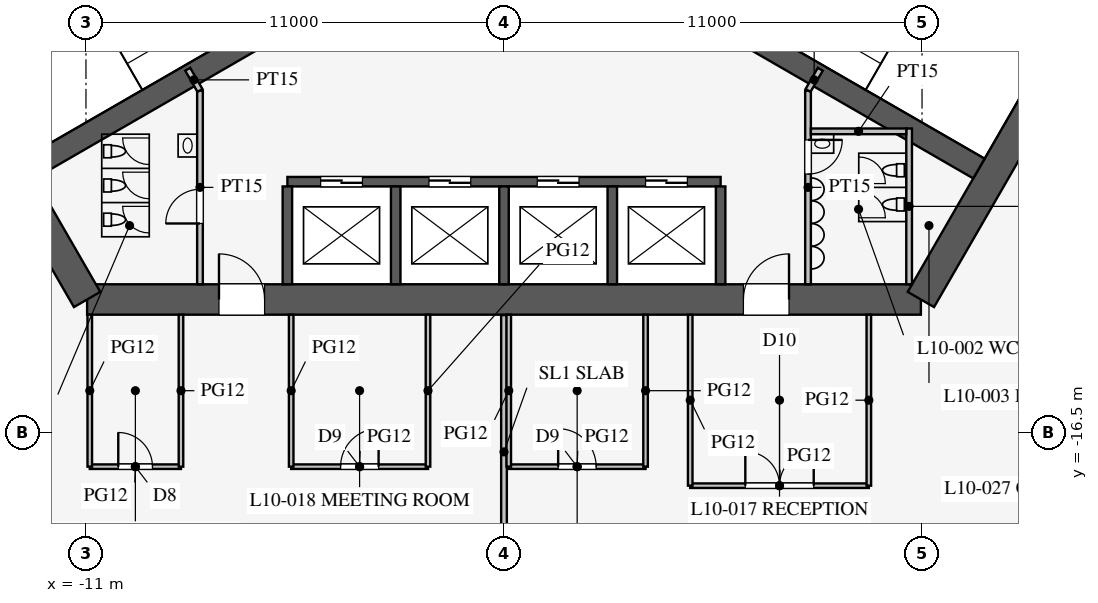
"""IFC4 building model, lengths in metres.
Left out: names, types, materials, properties, quantities, classifications, styles, units other than length and angle.
Written with IfcOpenShell. Run it as: python <this file> out.ifc"""

import sys

from ifc_helpers import new_model, si_unit, direction, frame, frame_2d, origin, place, context, subcontext, project, spatial, rectangle, extrude, element, fill, save


model = new_model("IFC4")
c1 = context("Model", 3, precision=1e-05, world=origin(), true_north=direction((0.0, 1.0)))
c2 = subcontext(c1, "Body", "Model", "MODEL_VIEW")
j1 = project(units=[si_unit("LENGTHUNIT", "METRE"), si_unit("PLANEANGLEUNIT", "RADIAN")], contexts=[c1])
p1 = place(None, origin())
s1 = spatial("IfcSite", under=j1, at=p1, CompositionType="ELEMENT")
p2 = place(p1, origin())
s2 = spatial("IfcBuilding", under=s1, at=p2, CompositionType="ELEMENT")
p3 = place(p2, frame((0.0, 0.0, 45.9)))
s3 = spatial("IfcBuildingStorey", under=s2, at=p3, CompositionType="ELEMENT", Elevation=45.9)
p4 = place(p3, frame((-10.97, -13.0, 0.0), z_axis=(0.0, 0.0, 1.0), x_axis=(1.0, 0.0, 0.0)))
e1 = element("IfcWall", 1, at=p4, inside=s3, PredefinedType="SHEAR", context=c2, shape_type="SweptSolid", body=[
    extrude(rectangle(XDim=21.939, YDim=0.8, at=frame_2d((10.97, 0.0))), origin(), (0.0, 0.0, 1.0), 4.2),
])
p5 = place(p4, frame((17.27, 0.0, 0.0)))
e2 = element("IfcOpeningElement", 2, at=p5, cuts=e1, PredefinedType="OPENING", context=c2, shape_type="SweptSolid", body=[
    extrude(rectangle(XDim=1.2, YDim=2.1, at=frame_2d((0.6, 1.05))), frame((0.0, 0.41, 0.0), z_axis=(0.0, -1.0, 0.0), x_axis=(1.0, 0.0, 0.0)), (0.0, 0.0, 1.0), 0.82),
])
p6 = place(p4, frame((3.47, 0.0, 0.0)))
e3 = element("IfcOpeningElement", 3, at=p6, cuts=e1, PredefinedType="OPENING", context=c2, shape_type="SweptSolid", body=[
    extrude(rectangle(XDim=1.2, YDim=2.1, at=frame_2d((0.6, 1.05))), frame((0.0, 0.41, 0.0), z_axis=(0.0, -1.0, 0.0), x_axis=(1.0, 0.0, 0.0)), (0.0, 0.0, 1.0), 0.82),
])
for number, where, z_axis, x_axis in (
    (4, (10.97, -13.0, 0.0), (0.0, 0.0, 1.0), (0.5, 0.866, 0.0)),
    (5, (-16.743, -3.0, 0.0), (0.0, 0.0, 1.0), (0.5, -0.866, 0.0)),
):
    element("IfcWall", number, at=place(p3, frame(where, z_axis=z_axis, x_axis=x_axis)), inside=s3, PredefinedType="SHEAR", context=c2, shape_type="SweptSolid", body=[
        extrude(rectangle(XDim=11.547, YDim=0.8, at=frame_2d((5.773, 0.0))), origin(), (0.0, 0.0, 1.0), 4.2),
    ])
p7 = place(p3, frame((-5.7, -9.9, 0.0), z_axis=(0.0, 0.0, 1.0), x_axis=(1.0, 0.0, 0.0)))
e6 = element("IfcWall", 6, at=p7, inside=s3, PredefinedType="SHEAR", context=c2, shape_type="SweptSolid", body=[
    extrude(rectangle(XDim=11.4, YDim=0.25, at=frame_2d((5.7, 0.0))), origin(), (0.0, 0.0, 1.0), 4.2),
])
p8 = place(p7, frame((0.875, 0.0, 0.0)))
e7 = element("IfcOpeningElement", 7, at=p8, cuts=e6, PredefinedType="OPENING", context=c2, shape_type="SweptSolid", body=[
    extrude(rectangle(XDim=1.1, YDim=2.2, at=frame_2d((0.55, 1.1))), frame((0.0, 0.135, 0.0), z_axis=(0.0, -1.0, 0.0), x_axis=(1.0, 0.0, 0.0)), (0.0, 0.0, 1.0), 0.27),
])
p9 = place(p7, frame((3.725, 0.0, 0.0)))
e8 = element("IfcOpeningElement", 8, at=p9, cuts=e6, PredefinedType="OPENING", context=c2, shape_type="SweptSolid", body=[
    extrude(rectangle(XDim=1.1, YDim=2.2, at=frame_2d((0.55, 1.1))), frame((0.0, 0.135, 0.0), z_axis=(0.0, -1.0, 0.0), x_axis=(1.0, 0.0, 0.0)), (0.0, 0.0, 1.0), 0.27),
])
p10 = place(p7, frame((6.575, 0.0, 0.0)))
e9 = element("IfcOpeningElement", 9, at=p10, cuts=e6, PredefinedType="OPENING", context=c2, shape_type="SweptSolid", body=[
    extrude(rectangle(XDim=1.1, YDim=2.2, at=frame_2d((0.55, 1.1))), frame((0.0, 0.135, 0.0), z_axis=(0.0, -1.0, 0.0), x_axis=(1.0, 0.0, 0.0)), (0.0, 0.0, 1.0), 0.27),
])
p11 = place(p7, frame((9.425, 0.0, 0.0)))
e10 = element("IfcOpeningElement", 10, at=p11, cuts=e6, PredefinedType="OPENING", context=c2, shape_type="SweptSolid", body=[
    extrude(rectangle(XDim=1.1, YDim=2.2, at=frame_2d((0.55, 1.1))), frame((0.0, 0.135, 0.0), z_axis=(0.0, -1.0, 0.0), x_axis=(1.0, 0.0, 0.0)), (0.0, 0.0, 1.0), 0.27),
])
for number, where, z_axis, x_axis in (
    (11, (-5.7, -10.025, 0.0), (0.0, 0.0, 1.0), (0.0, -1.0, 0.0)),
    (12, (-2.85, -10.025, 0.0), (0.0, 0.0, 1.0), (0.0, -1.0, 0.0)),
    (13, (0.0, -10.025, 0.0), (0.0, 0.0, 1.0), (0.0, -1.0, 0.0)),
    (14, (2.85, -10.025, 0.0), (0.0, 0.0, 1.0), (0.0, -1.0, 0.0)),
    (15, (5.7, -10.025, 0.0), (0.0, 0.0, 1.0), (0.0, -1.0, 0.0)),
):
    element("IfcWall", number, at=place(p3, frame(where, z_axis=z_axis, x_axis=x_axis)), inside=s3, PredefinedType="SHEAR", context=c2, shape_type="SweptSolid", body=[
        extrude(rectangle(XDim=2.575, YDim=0.25, at=frame_2d((1.288, 0.0))), origin(), (0.0, 0.0, 1.0), 4.2),
    ])
for number, where, z_axis, x_axis in (
    (16, (4.638, -5.016, 0.0), (0.0, 0.0, 1.0), (0.866, -0.5, 0.0)),
    (17, (-4.638, -5.016, 0.0), (0.0, 0.0, 1.0), (-0.866, -0.5, 0.0)),
):
    element("IfcWall", number, at=place(p3, frame(where, z_axis=z_axis, x_axis=x_axis)), inside=s3, PredefinedType="SHEAR", context=c2, shape_type="SweptSolid", body=[
        extrude(rectangle(XDim=9.075, YDim=0.6, at=frame_2d((4.538, 0.0))), origin(), (0.0, 0.0, 1.0), 4.2),
    ])
p12 = place(p3, frame((8.0, -7.5, 0.0), z_axis=(0.0, 0.0, 1.0), x_axis=(0.0, -1.0, 0.0)))
e18 = element("IfcWall", 18, at=p12, inside=s3, PredefinedType="PARTITIONING", context=c2, shape_type="SweptSolid", body=[
    extrude(rectangle(XDim=5.1, YDim=0.15, at=frame_2d((2.55, 0.0))), origin(), (0.0, 0.0, 1.0), 4.0),
])
p13 = place(p12, frame((1.3, 0.0, 0.0)))
e19 = element("IfcOpeningElement", 19, at=p13, cuts=e18, PredefinedType="OPENING", context=c2, shape_type="SweptSolid", body=[
    extrude(rectangle(XDim=0.9, YDim=2.1, at=frame_2d((0.45, 1.05))), frame((0.0, 0.085, 0.0), z_axis=(0.0, -1.0, 0.0), x_axis=(1.0, 0.0, 0.0)), (0.0, 0.0, 1.0), 0.17),
])
p14 = place(p3, frame((-8.0, -7.5, 0.0), z_axis=(0.0, 0.0, 1.0), x_axis=(0.0, -1.0, 0.0)))
e20 = element("IfcWall", 20, at=p14, inside=s3, PredefinedType="PARTITIONING", context=c2, shape_type="SweptSolid", body=[
    extrude(rectangle(XDim=5.1, YDim=0.15, at=frame_2d((2.55, 0.0))), origin(), (0.0, 0.0, 1.0), 4.0),
])
p15 = place(p14, frame((2.6, 0.0, 0.0)))
e21 = element("IfcOpeningElement", 21, at=p15, cuts=e20, PredefinedType="OPENING", context=c2, shape_type="SweptSolid", body=[
    extrude(rectangle(XDim=0.9, YDim=2.1, at=frame_2d((0.45, 1.05))), frame((0.0, 0.085, 0.0), z_axis=(0.0, -1.0, 0.0), x_axis=(1.0, 0.0, 0.0)), (0.0, 0.0, 1.0), 0.17),
])
for number, where, z_axis, x_axis in (
    (22, (8.0, -7.5, 0.0), (0.0, 0.0, 1.0), (0.5, 0.866, 0.0)),
    (23, (-8.0, -7.5, 0.0), (0.0, 0.0, 1.0), (-0.5, 0.866, 0.0)),
):
    element("IfcWall", number, at=place(p3, frame(where, z_axis=z_axis, x_axis=x_axis)), inside=s3, PredefinedType="PARTITIONING", context=c2, shape_type="SweptSolid", body=[
        extrude(rectangle(XDim=0.645, YDim=0.15, at=frame_2d((0.323, 0.0))), origin(), (0.0, 0.0, 1.0), 4.0),
    ])
p16 = place(p3, frame((10.66, -8.5, 0.0), z_axis=(0.0, 0.0, 1.0), x_axis=(0.0, -1.0, 0.0)))
e24 = element("IfcWall", 24, at=p16, inside=s3, PredefinedType="PARTITIONING", context=c2, shape_type="SweptSolid", body=[
    extrude(rectangle(XDim=4.1, YDim=0.15, at=frame_2d((2.05, 0.0))), origin(), (0.0, 0.0, 1.0), 4.0),
])
p17 = place(p3, frame((8.075, -8.575, 0.0), z_axis=(0.0, 0.0, 1.0), x_axis=(1.0, 0.0, 0.0)))
e25 = element("IfcWall", 25, at=p17, inside=s3, PredefinedType="PARTITIONING", context=c2, shape_type="SweptSolid", body=[
    extrude(rectangle(XDim=2.51, YDim=0.15, at=frame_2d((1.255, 0.0))), origin(), (0.0, 0.0, 1.0), 4.0),
])
p18 = place(p3, frame((0.0, -13.41, 0.0), z_axis=(0.0, 0.0, 1.0), x_axis=(0.0, -1.0, 0.0)))
e26 = element("IfcWall", 26, at=p18, inside=s3, PredefinedType="PARTITIONING", context=c2, shape_type="SweptSolid", body=[
    extrude(rectangle(XDim=12.759, YDim=0.15, at=frame_2d((6.379, 0.0))), origin(), (0.0, 0.0, 1.0), 3.2),
])
p19 = place(p3, frame((0.125, -17.4, 0.0), z_axis=(0.0, 0.0, 1.0), x_axis=(1.0, 0.0, 0.0)))
e27 = element("IfcWall", 27, at=p19, inside=s3, PredefinedType="PARTITIONING", context=c2, shape_type="SweptSolid", body=[
    extrude(rectangle(XDim=3.6, YDim=0.12, at=frame_2d((1.8, 0.0))), origin(), (0.0, 0.0, 1.0), 2.9),
])
p20 = place(p19, frame((1.3, 0.0, 0.15)))
e28 = element("IfcOpeningElement", 28, at=p20, cuts=e27, PredefinedType="OPENING", context=c2, shape_type="SweptSolid", body=[
    extrude(rectangle(XDim=1.0, YDim=2.1, at=frame_2d((0.5, 1.05))), frame((0.0, 0.07, 0.0), z_axis=(0.0, -1.0, 0.0), x_axis=(1.0, 0.0, 0.0)), (0.0, 0.0, 1.0), 0.14),
])
p21 = place(p3, frame((4.9, -17.9, 0.0), z_axis=(0.0, 0.0, 1.0), x_axis=(1.0, 0.0, 0.0)))
e29 = element("IfcWall", 29, at=p21, inside=s3, PredefinedType="PARTITIONING", context=c2, shape_type="SweptSolid", body=[
    extrude(rectangle(XDim=4.7, YDim=0.12, at=frame_2d((2.35, 0.0))), origin(), (0.0, 0.0, 1.0), 2.9),
])
p22 = place(p21, frame((1.45, 0.0, 0.15)))
e30 = element("IfcOpeningElement", 30, at=p22, cuts=e29, PredefinedType="OPENING", context=c2, shape_type="SweptSolid", body=[
    extrude(rectangle(XDim=1.8, YDim=2.1, at=frame_2d((0.9, 1.05))), frame((0.0, 0.07, 0.0), z_axis=(0.0, -1.0, 0.0), x_axis=(1.0, 0.0, 0.0)), (0.0, 0.0, 1.0), 0.14),
])
p23 = place(p3, frame((-10.9, -17.4, 0.0), z_axis=(0.0, 0.0, 1.0), x_axis=(1.0, 0.0, 0.0)))
e31 = element("IfcWall", 31, at=p23, inside=s3, PredefinedType="PARTITIONING", context=c2, shape_type="SweptSolid", body=[
    extrude(rectangle(XDim=2.4, YDim=0.12, at=frame_2d((1.2, 0.0))), origin(), (0.0, 0.0, 1.0), 2.9),
])
p24 = place(p23, frame((0.75, 0.0, 0.15)))
e32 = element("IfcOpeningElement", 32, at=p24, cuts=e31, PredefinedType="OPENING", context=c2, shape_type="SweptSolid", body=[
    extrude(rectangle(XDim=0.9, YDim=2.1, at=frame_2d((0.45, 1.05))), frame((0.0, 0.07, 0.0), z_axis=(0.0, -1.0, 0.0), x_axis=(1.0, 0.0, 0.0)), (0.0, 0.0, 1.0), 0.14),
])
p25 = place(p3, frame((-5.6, -17.4, 0.0), z_axis=(0.0, 0.0, 1.0), x_axis=(1.0, 0.0, 0.0)))
e33 = element("IfcWall", 33, at=p25, inside=s3, PredefinedType="PARTITIONING", context=c2, shape_type="SweptSolid", body=[
    extrude(rectangle(XDim=3.6, YDim=0.12, at=frame_2d((1.8, 0.0))), origin(), (0.0, 0.0, 1.0), 2.9),
])
p26 = place(p25, frame((1.3, 0.0, 0.15)))
e34 = element("IfcOpeningElement", 34, at=p26, cuts=e33, PredefinedType="OPENING", context=c2, shape_type="SweptSolid", body=[
    extrude(rectangle(XDim=1.0, YDim=2.1, at=frame_2d((0.5, 1.05))), frame((0.0, 0.07, 0.0), z_axis=(0.0, -1.0, 0.0), x_axis=(1.0, 0.0, 0.0)), (0.0, 0.0, 1.0), 0.14),
])
for number, where, z_axis, x_axis in (
    (35, (0.125, -13.4, 0.0), (0.0, 0.0, 1.0), (0.0, -1.0, 0.0)),
    (36, (3.725, -13.4, 0.0), (0.0, 0.0, 1.0), (0.0, -1.0, 0.0)),
):
    element("IfcWall", number, at=place(p3, frame(where, z_axis=z_axis, x_axis=x_axis)), inside=s3, PredefinedType="PARTITIONING", context=c2, shape_type="SweptSolid", body=[
        extrude(rectangle(XDim=4.0, YDim=0.12, at=frame_2d((2.0, 0.0))), origin(), (0.0, 0.0, 1.0), 2.9),
    ])
for number, where, z_axis, x_axis in (
    (37, (4.9, -13.4, 0.0), (0.0, 0.0, 1.0), (0.0, -1.0, 0.0)),
    (38, (9.6, -13.4, 0.0), (0.0, 0.0, 1.0), (0.0, -1.0, 0.0)),
):
    element("IfcWall", number, at=place(p3, frame(where, z_axis=z_axis, x_axis=x_axis)), inside=s3, PredefinedType="PARTITIONING", context=c2, shape_type="SweptSolid", body=[
        extrude(rectangle(XDim=4.5, YDim=0.12, at=frame_2d((2.25, 0.0))), origin(), (0.0, 0.0, 1.0), 2.9),
    ])
for number, where, z_axis, x_axis in (
    (39, (-10.9, -13.4, 0.0), (0.0, 0.0, 1.0), (0.0, -1.0, 0.0)),
    (40, (-2.0, -13.4, 0.0), (0.0, 0.0, 1.0), (0.0, -1.0, 0.0)),
    (41, (-5.6, -13.4, 0.0), (0.0, 0.0, 1.0), (0.0, -1.0, 0.0)),
    (42, (-8.5, -13.4, 0.0), (0.0, 0.0, 1.0), (0.0, -1.0, 0.0)),
):
    element("IfcWall", number, at=place(p3, frame(where, z_axis=z_axis, x_axis=x_axis)), inside=s3, PredefinedType="PARTITIONING", context=c2, shape_type="SweptSolid", body=[
        extrude(rectangle(XDim=4.0, YDim=0.12, at=frame_2d((2.0, 0.0))), origin(), (0.0, 0.0, 1.0), 2.9),
    ])
p27 = place(p13, origin())
e43 = element("IfcDoor", 43, at=p27, inside=s3, OperationType="SINGLE_SWING_LEFT", PredefinedType="DOOR", context=c2, shape_type="SweptSolid", body=[
    extrude(rectangle(XDim=0.9, YDim=2.1, at=frame_2d((0.45, 1.05))), frame((0.0, 0.025, 0.0), z_axis=(0.0, -1.0, 0.0), x_axis=(1.0, 0.0, 0.0)), (0.0, 0.0, 1.0), 0.05),
])
fill(e19, e43)
p28 = place(p15, frame((0.9, 0.0, 0.0), z_axis=(0.0, 0.0, 1.0), x_axis=(-1.0, 0.0, 0.0)))
e44 = element("IfcDoor", 44, at=p28, inside=s3, OperationType="SINGLE_SWING_LEFT", PredefinedType="DOOR", context=c2, shape_type="SweptSolid", body=[
    extrude(rectangle(XDim=0.9, YDim=2.1, at=frame_2d((0.45, 1.05))), frame((0.0, 0.025, 0.0), z_axis=(0.0, -1.0, 0.0), x_axis=(1.0, 0.0, 0.0)), (0.0, 0.0, 1.0), 0.05),
])
fill(e21, e44)
p29 = place(p5, origin())
e45 = element("IfcDoor", 45, at=p29, inside=s3, OperationType="SINGLE_SWING_RIGHT", PredefinedType="DOOR", context=c2, shape_type="SweptSolid", body=[
    extrude(rectangle(XDim=1.2, YDim=2.1, at=frame_2d((0.6, 1.05))), frame((0.0, 0.025, 0.0), z_axis=(0.0, -1.0, 0.0), x_axis=(1.0, 0.0, 0.0)), (0.0, 0.0, 1.0), 0.05),
])
fill(e2, e45)
p30 = place(p6, origin())
e46 = element("IfcDoor", 46, at=p30, inside=s3, OperationType="SINGLE_SWING_LEFT", PredefinedType="DOOR", context=c2, shape_type="SweptSolid", body=[
    extrude(rectangle(XDim=1.2, YDim=2.1, at=frame_2d((0.6, 1.05))), frame((0.0, 0.025, 0.0), z_axis=(0.0, -1.0, 0.0), x_axis=(1.0, 0.0, 0.0)), (0.0, 0.0, 1.0), 0.05),
])
fill(e3, e46)
p31 = place(p22, origin())
e47 = element("IfcDoor", 47, at=p31, inside=s3, OperationType="DOUBLE_DOOR_SINGLE_SWING", PredefinedType="DOOR", context=c2, shape_type="SweptSolid", body=[
    extrude(rectangle(XDim=1.8, YDim=2.1, at=frame_2d((0.9, 1.05))), frame((0.0, 0.025, 0.0), z_axis=(0.0, -1.0, 0.0), x_axis=(1.0, 0.0, 0.0)), (0.0, 0.0, 1.0), 0.05),
])
fill(e30, e47)
p32 = place(p26, origin())
e48 = element("IfcDoor", 48, at=p32, inside=s3, OperationType="SINGLE_SWING_RIGHT", PredefinedType="DOOR", context=c2, shape_type="SweptSolid", body=[
    extrude(rectangle(XDim=1.0, YDim=2.1, at=frame_2d((0.5, 1.05))), frame((0.0, 0.025, 0.0), z_axis=(0.0, -1.0, 0.0), x_axis=(1.0, 0.0, 0.0)), (0.0, 0.0, 1.0), 0.05),
])
fill(e34, e48)
p33 = place(p20, origin())
e49 = element("IfcDoor", 49, at=p33, inside=s3, OperationType="SINGLE_SWING_LEFT", PredefinedType="DOOR", context=c2, shape_type="SweptSolid", body=[
    extrude(rectangle(XDim=1.0, YDim=2.1, at=frame_2d((0.5, 1.05))), frame((0.0, 0.025, 0.0), z_axis=(0.0, -1.0, 0.0), x_axis=(1.0, 0.0, 0.0)), (0.0, 0.0, 1.0), 0.05),
])
fill(e28, e49)
p34 = place(p24, origin())
e50 = element("IfcDoor", 50, at=p34, inside=s3, OperationType="SINGLE_SWING_LEFT", PredefinedType="DOOR", context=c2, shape_type="SweptSolid", body=[
    extrude(rectangle(XDim=0.9, YDim=2.1, at=frame_2d((0.45, 1.05))), frame((0.0, 0.025, 0.0), z_axis=(0.0, -1.0, 0.0), x_axis=(1.0, 0.0, 0.0)), (0.0, 0.0, 1.0), 0.05),
])
fill(e32, e50)
p35 = place(p8, origin())
e51 = element("IfcDoor", 51, at=p35, inside=s3, OperationType="DOUBLE_DOOR_SLIDING", PredefinedType="DOOR", context=c2, shape_type="SweptSolid", body=[
    extrude(rectangle(XDim=1.1, YDim=2.2, at=frame_2d((0.55, 1.1))), frame((0.0, 0.025, 0.0), z_axis=(0.0, -1.0, 0.0), x_axis=(1.0, 0.0, 0.0)), (0.0, 0.0, 1.0), 0.05),
])
fill(e7, e51)
p36 = place(p9, origin())
e52 = element("IfcDoor", 52, at=p36, inside=s3, OperationType="DOUBLE_DOOR_SLIDING", PredefinedType="DOOR", context=c2, shape_type="SweptSolid", body=[
    extrude(rectangle(XDim=1.1, YDim=2.2, at=frame_2d((0.55, 1.1))), frame((0.0, 0.025, 0.0), z_axis=(0.0, -1.0, 0.0), x_axis=(1.0, 0.0, 0.0)), (0.0, 0.0, 1.0), 0.05),
])
fill(e8, e52)
p37 = place(p10, origin())
e53 = element("IfcDoor", 53, at=p37, inside=s3, OperationType="DOUBLE_DOOR_SLIDING", PredefinedType="DOOR", context=c2, shape_type="SweptSolid", body=[
    extrude(rectangle(XDim=1.1, YDim=2.2, at=frame_2d((0.55, 1.1))), frame((0.0, 0.025, 0.0), z_axis=(0.0, -1.0, 0.0), x_axis=(1.0, 0.0, 0.0)), (0.0, 0.0, 1.0), 0.05),
])
fill(e9, e53)
p38 = place(p11, origin())
e54 = element("IfcDoor", 54, at=p38, inside=s3, OperationType="DOUBLE_DOOR_SLIDING", PredefinedType="DOOR", context=c2, shape_type="SweptSolid", body=[
    extrude(rectangle(XDim=1.1, YDim=2.2, at=frame_2d((0.55, 1.1))), frame((0.0, 0.025, 0.0), z_axis=(0.0, -1.0, 0.0), x_axis=(1.0, 0.0, 0.0)), (0.0, 0.0, 1.0), 0.05),
])
fill(e10, e54)
save(model, sys.argv[1])
